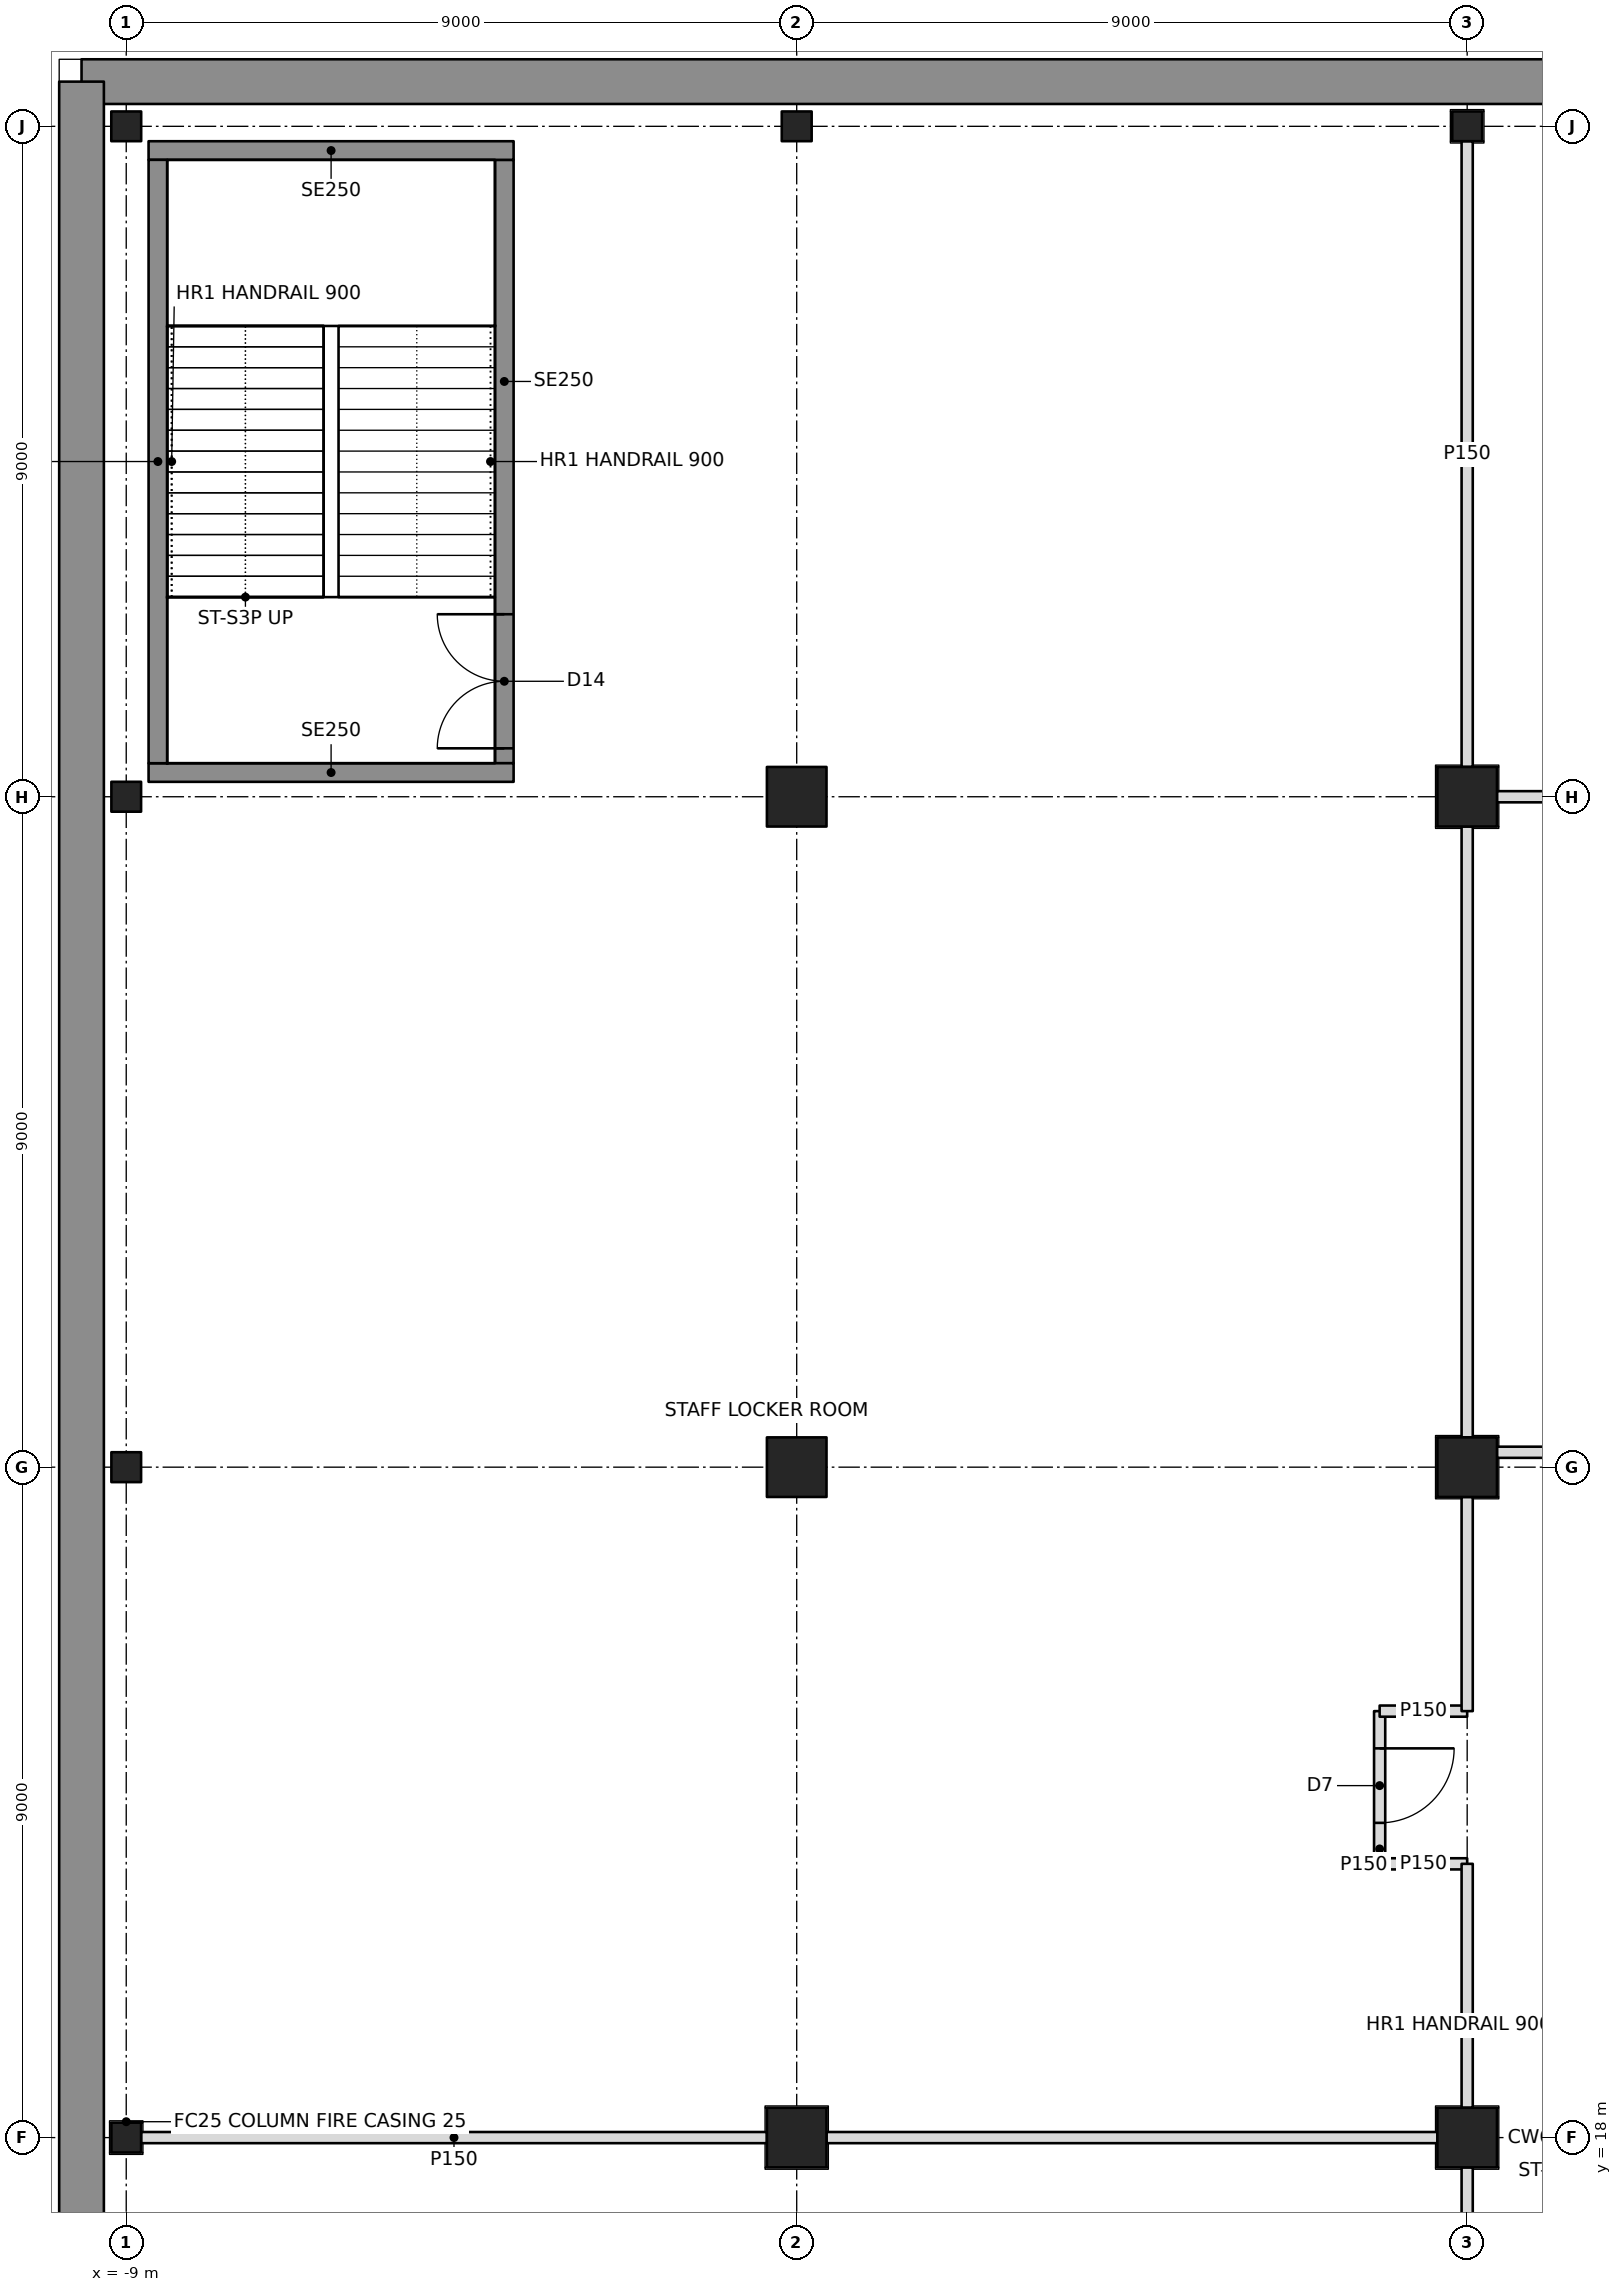
"""IFC4 building model, lengths in metres.
Left out: names, types, materials, properties, quantities, classifications, styles, units other than length and angle.
Written with IfcOpenShell. Run it as: python <this file> out.ifc"""

import sys

from ifc_helpers import new_model, si_unit, direction, frame, frame_2d, origin, origin_2d, place, context, subcontext, project, spatial, rectangle, hollow_rectangle, i_section, extrude, element, fill, save


model = new_model("IFC4")
c1 = context("Model", 3, precision=1e-05, world=origin(), true_north=direction((0.0, 1.0)))
c2 = subcontext(c1, "Body", "Model", "MODEL_VIEW")
j1 = project(units=[si_unit("LENGTHUNIT", "METRE"), si_unit("PLANEANGLEUNIT", "RADIAN")], contexts=[c1])
p1 = place(None, origin())
s1 = spatial("IfcSite", under=j1, at=p1, CompositionType="ELEMENT")
p2 = place(p1, origin())
s2 = spatial("IfcBuilding", under=s1, at=p2, CompositionType="ELEMENT")
p3 = place(p2, frame((0.0, 0.0, -10.5)))
s3 = spatial("IfcBuildingStorey", under=s2, at=p3, CompositionType="ELEMENT", Elevation=-10.5)
for number, where, z_axis, x_axis in (
    (1, (-9.0, 18.0, -0.5), (0.0, 0.0, 1.0), (0.0, 1.0, 0.0)),
    (2, (-9.0, 27.0, -0.5), (0.0, 0.0, 1.0), (0.0, 1.0, 0.0)),
    (3, (-9.0, 36.0, -0.5), (0.0, 0.0, 1.0), (0.0, 1.0, 0.0)),
    (4, (-9.0, 45.0, -0.5), (0.0, 0.0, 1.0), (1.0, 0.0, 0.0)),
):
    element("IfcColumn", number, at=place(p3, frame(where, z_axis=z_axis, x_axis=x_axis)), inside=s3, PredefinedType="COLUMN", context=c2, shape_type="SweptSolid", body=[
        extrude(i_section(OverallWidth=0.401, OverallDepth=0.399, WebThickness=0.025, FlangeThickness=0.04, at=origin_2d()), origin(), (0.0, 0.0, 1.0), 5.5),
    ])
for number, where, z_axis, x_axis in (
    (5, (0.0, 18.0, -0.5), (0.0, 0.0, 1.0), (0.0, 1.0, 0.0)),
    (6, (0.0, 27.0, -0.5), (0.0, 0.0, 1.0), (0.0, 1.0, 0.0)),
    (7, (0.0, 36.0, -0.5), (0.0, 0.0, 1.0), (1.0, 0.0, 0.0)),
):
    element("IfcColumn", number, at=place(p3, frame(where, z_axis=z_axis, x_axis=x_axis)), inside=s3, PredefinedType="COLUMN", context=c2, shape_type="SweptSolid", body=[
        extrude(hollow_rectangle(XDim=0.8, YDim=0.8, WallThickness=0.1, at=origin_2d()), origin(), (0.0, 0.0, 1.0), 5.5),
    ])
p4 = place(p3, frame((0.0, 45.0, -0.5), z_axis=(0.0, 0.0, 1.0), x_axis=(1.0, 0.0, 0.0)))
e8 = element("IfcColumn", 8, at=p4, inside=s3, PredefinedType="COLUMN", context=c2, shape_type="SweptSolid", body=[
    extrude(i_section(OverallWidth=0.401, OverallDepth=0.399, WebThickness=0.025, FlangeThickness=0.04, at=origin_2d()), origin(), (0.0, 0.0, 1.0), 5.5),
])
for number, where, z_axis, x_axis in (
    (9, (9.0, 18.0, -0.5), (0.0, 0.0, 1.0), (1.0, 0.0, 0.0)),
    (10, (9.0, 27.0, -0.5), (0.0, 0.0, 1.0), (1.0, 0.0, 0.0)),
    (11, (9.0, 36.0, -0.5), (0.0, 0.0, 1.0), (1.0, 0.0, 0.0)),
):
    element("IfcColumn", number, at=place(p3, frame(where, z_axis=z_axis, x_axis=x_axis)), inside=s3, PredefinedType="COLUMN", context=c2, shape_type="SweptSolid", body=[
        extrude(hollow_rectangle(XDim=0.8, YDim=0.8, WallThickness=0.1, at=origin_2d()), origin(), (0.0, 0.0, 1.0), 5.5),
    ])
p5 = place(p3, frame((9.0, 45.0, -0.5), z_axis=(0.0, 0.0, 1.0), x_axis=(1.0, 0.0, 0.0)))
e12 = element("IfcColumn", 12, at=p5, inside=s3, PredefinedType="COLUMN", context=c2, shape_type="SweptSolid", body=[
    extrude(i_section(OverallWidth=0.401, OverallDepth=0.399, WebThickness=0.025, FlangeThickness=0.04, at=origin_2d()), origin(), (0.0, 0.0, 1.0), 5.5),
])
for number, where, z_axis, x_axis in (
    (13, (63.6, 45.6, 0.0), (0.0, 0.0, 1.0), (-1.0, 0.0, 0.0)),
    (14, (-9.6, 45.6, 0.0), (0.0, 0.0, 1.0), (0.0, -1.0, 0.0)),
):
    element("IfcWall", number, at=place(p3, frame(where, z_axis=z_axis, x_axis=x_axis)), inside=s3, PredefinedType="SOLIDWALL", context=c2, shape_type="SweptSolid", body=[
        extrude(rectangle(XDim=73.2, YDim=0.6, at=frame_2d((36.6, 0.0))), origin(), (0.0, 0.0, 1.0), 4.7),
    ])
p6 = place(p3, frame((-8.801, 18.0, 0.0), z_axis=(0.0, 0.0, 1.0), x_axis=(1.0, 0.0, 0.0)))
e15 = element("IfcWall", 15, at=p6, inside=s3, PredefinedType="PARTITIONING", context=c2, shape_type="SweptSolid", body=[
    extrude(rectangle(XDim=8.401, YDim=0.15, at=frame_2d((4.2, 0.0))), origin(), (0.0, 0.0, 1.0), 3.842),
])
p7 = place(p3, frame((0.4, 18.0, 0.0), z_axis=(0.0, 0.0, 1.0), x_axis=(1.0, 0.0, 0.0)))
e16 = element("IfcWall", 16, at=p7, inside=s3, PredefinedType="PARTITIONING", context=c2, shape_type="SweptSolid", body=[
    extrude(rectangle(XDim=8.2, YDim=0.15, at=frame_2d((4.1, 0.0))), origin(), (0.0, 0.0, 1.0), 3.842),
])
p8 = place(p3, frame((9.0, 17.6, 0.0), z_axis=(0.0, 0.0, 1.0), x_axis=(0.0, -1.0, 0.0)))
e17 = element("IfcWall", 17, at=p8, inside=s3, PredefinedType="PARTITIONING", context=c2, shape_type="SweptSolid", body=[
    extrude(rectangle(XDim=8.2, YDim=0.15, at=frame_2d((4.1, 0.0))), origin(), (0.0, 0.0, 1.0), 3.842),
])
p9 = place(p8, frame((6.6, 0.0, 0.0)))
e18 = element("IfcOpeningElement", 18, at=p9, cuts=e17, PredefinedType="OPENING", context=c2, shape_type="SweptSolid", body=[
    extrude(rectangle(XDim=1.0, YDim=2.1, at=frame_2d((0.5, 1.05))), frame((0.0, 0.085, 0.0), z_axis=(0.0, -1.0, 0.0), x_axis=(1.0, 0.0, 0.0)), (0.0, 0.0, 1.0), 0.17),
])
p10 = place(p3, frame((9.0, 26.6, 0.0), z_axis=(0.0, 0.0, 1.0), x_axis=(0.0, -1.0, 0.0)))
e19 = element("IfcWall", 19, at=p10, inside=s3, PredefinedType="PARTITIONING", context=c2, shape_type="SweptSolid", body=[
    extrude(rectangle(XDim=2.875, YDim=0.15, at=frame_2d((1.438, 0.0))), origin(), (0.0, 0.0, 1.0), 3.842),
])
p11 = place(p3, frame((15.0, 27.2, 0.0), z_axis=(0.0, 0.0, 1.0), x_axis=(-1.0, 0.0, 0.0)))
e20 = element("IfcWall", 20, at=p11, inside=s3, PredefinedType="PARTITIONING", context=c2, shape_type="SweptSolid", body=[
    extrude(rectangle(XDim=5.6, YDim=0.15, at=frame_2d((2.8, 0.0))), origin(), (0.0, 0.0, 1.0), 3.842),
])
p12 = place(p11, frame((2.5, 0.0, 0.0)))
e21 = element("IfcOpeningElement", 21, at=p12, cuts=e20, PredefinedType="OPENING", context=c2, shape_type="SweptSolid", body=[
    extrude(rectangle(XDim=1.0, YDim=2.1, at=frame_2d((0.5, 1.05))), frame((0.0, 0.085, 0.0), z_axis=(0.0, -1.0, 0.0), x_axis=(1.0, 0.0, 0.0)), (0.0, 0.0, 1.0), 0.17),
])
p13 = place(p3, frame((9.0, 35.6, 0.0), z_axis=(0.0, 0.0, 1.0), x_axis=(0.0, -1.0, 0.0)))
e22 = element("IfcWall", 22, at=p13, inside=s3, PredefinedType="PARTITIONING", context=c2, shape_type="SweptSolid", body=[
    extrude(rectangle(XDim=8.2, YDim=0.15, at=frame_2d((4.1, 0.0))), origin(), (0.0, 0.0, 1.0), 3.842),
])
p14 = place(p3, frame((9.4, 36.0, 0.0), z_axis=(0.0, 0.0, 1.0), x_axis=(1.0, 0.0, 0.0)))
e23 = element("IfcWall", 23, at=p14, inside=s3, PredefinedType="PARTITIONING", context=c2, shape_type="SweptSolid", body=[
    extrude(rectangle(XDim=5.6, YDim=0.15, at=frame_2d((2.8, 0.0))), origin(), (0.0, 0.0, 1.0), 3.842),
])
p15 = place(p3, frame((9.0, 44.801, 0.0), z_axis=(0.0, 0.0, 1.0), x_axis=(0.0, -1.0, 0.0)))
e24 = element("IfcWall", 24, at=p15, inside=s3, PredefinedType="PARTITIONING", context=c2, shape_type="SweptSolid", body=[
    extrude(rectangle(XDim=8.401, YDim=0.15, at=frame_2d((4.2, 0.0))), origin(), (0.0, 0.0, 1.0), 3.842),
])
p16 = place(p3, frame((9.0, 21.675, 0.0), z_axis=(0.0, 0.0, 1.0), x_axis=(0.0, -1.0, 0.0)))
e25 = element("IfcWall", 25, at=p16, inside=s3, PredefinedType="PARTITIONING", context=c2, shape_type="SweptSolid", body=[
    extrude(rectangle(XDim=3.275, YDim=0.15, at=frame_2d((1.638, 0.0))), origin(), (0.0, 0.0, 1.0), 3.842),
])
for number, where, z_axis, x_axis in (
    (26, (9.0, 23.725, 0.0), (0.0, 0.0, 1.0), (-1.0, 0.0, 0.0)),
    (27, (9.0, 21.675, 0.0), (0.0, 0.0, 1.0), (-1.0, 0.0, 0.0)),
):
    element("IfcWall", number, at=place(p3, frame(where, z_axis=z_axis, x_axis=x_axis)), inside=s3, PredefinedType="PARTITIONING", context=c2, shape_type="SweptSolid", body=[
        extrude(rectangle(XDim=1.175, YDim=0.15, at=frame_2d((0.587, 0.0))), origin(), (0.0, 0.0, 1.0), 3.841),
    ])
p17 = place(p3, frame((7.825, 23.725, 0.0), z_axis=(0.0, 0.0, 1.0), x_axis=(0.0, -1.0, 0.0)))
e28 = element("IfcWall", 28, at=p17, inside=s3, PredefinedType="PARTITIONING", context=c2, shape_type="SweptSolid", body=[
    extrude(rectangle(XDim=2.05, YDim=0.15, at=frame_2d((1.025, 0.0))), origin(), (0.0, 0.0, 1.0), 4.7),
])
p18 = place(p17, frame((0.5, 0.0, 0.0)))
e29 = element("IfcOpeningElement", 29, at=p18, cuts=e28, PredefinedType="OPENING", context=c2, shape_type="SweptSolid", body=[
    extrude(rectangle(XDim=1.0, YDim=2.1, at=frame_2d((0.5, 1.05))), frame((0.0, 0.085, 0.0), z_axis=(0.0, -1.0, 0.0), x_axis=(1.0, 0.0, 0.0)), (0.0, 0.0, 1.0), 0.17),
])
for number, where, z_axis, x_axis in (
    (30, (-8.7, 36.325, 0.0), (0.0, 0.0, 1.0), (1.0, 0.0, 0.0)),
    (31, (-8.7, 44.675, 0.0), (0.0, 0.0, 1.0), (1.0, 0.0, 0.0)),
):
    element("IfcWall", number, at=place(p3, frame(where, z_axis=z_axis, x_axis=x_axis)), inside=s3, PredefinedType="SOLIDWALL", context=c2, shape_type="SweptSolid", body=[
        extrude(rectangle(XDim=4.9, YDim=0.25, at=frame_2d((2.45, 0.0))), origin(), (0.0, 0.0, 1.0), 4.7),
    ])
p19 = place(p3, frame((-8.575, 36.45, 0.0), z_axis=(0.0, 0.0, 1.0), x_axis=(0.0, 1.0, 0.0)))
e32 = element("IfcWall", 32, at=p19, inside=s3, PredefinedType="SOLIDWALL", context=c2, shape_type="SweptSolid", body=[
    extrude(rectangle(XDim=8.1, YDim=0.25, at=frame_2d((4.05, 0.0))), origin(), (0.0, 0.0, 1.0), 4.7),
])
p20 = place(p3, frame((-3.925, 36.45, 0.0), z_axis=(0.0, 0.0, 1.0), x_axis=(0.0, 1.0, 0.0)))
e33 = element("IfcWall", 33, at=p20, inside=s3, PredefinedType="SOLIDWALL", context=c2, shape_type="SweptSolid", body=[
    extrude(rectangle(XDim=8.1, YDim=0.25, at=frame_2d((4.05, 0.0))), origin(), (0.0, 0.0, 1.0), 4.7),
])
p21 = place(p20, frame((0.2, 0.0, 0.0)))
e34 = element("IfcOpeningElement", 34, at=p21, cuts=e33, PredefinedType="OPENING", context=c2, shape_type="SweptSolid", body=[
    extrude(rectangle(XDim=1.8, YDim=2.1, at=frame_2d((0.9, 1.05))), frame((0.0, 0.135, 0.0), z_axis=(0.0, -1.0, 0.0), x_axis=(1.0, 0.0, 0.0)), (0.0, 0.0, 1.0), 0.27),
])
p22 = place(p18, origin())
e35 = element("IfcDoor", 35, at=p22, inside=s3, OperationType="SINGLE_SWING_LEFT", PredefinedType="DOOR", context=c2, shape_type="SweptSolid", body=[
    extrude(rectangle(XDim=1.0, YDim=2.1, at=frame_2d((0.5, 1.05))), frame((0.0, 0.025, 0.0), z_axis=(0.0, -1.0, 0.0), x_axis=(1.0, 0.0, 0.0)), (0.0, 0.0, 1.0), 0.05),
])
fill(e29, e35)
p23 = place(p21, origin())
e36 = element("IfcDoor", 36, at=p23, inside=s3, OperationType="DOUBLE_DOOR_SINGLE_SWING", PredefinedType="DOOR", context=c2, shape_type="SweptSolid", body=[
    extrude(rectangle(XDim=1.8, YDim=2.1, at=frame_2d((0.9, 1.05))), frame((0.0, 0.025, 0.0), z_axis=(0.0, -1.0, 0.0), x_axis=(1.0, 0.0, 0.0)), (0.0, 0.0, 1.0), 0.05),
])
fill(e34, e36)
save(model, sys.argv[1])
